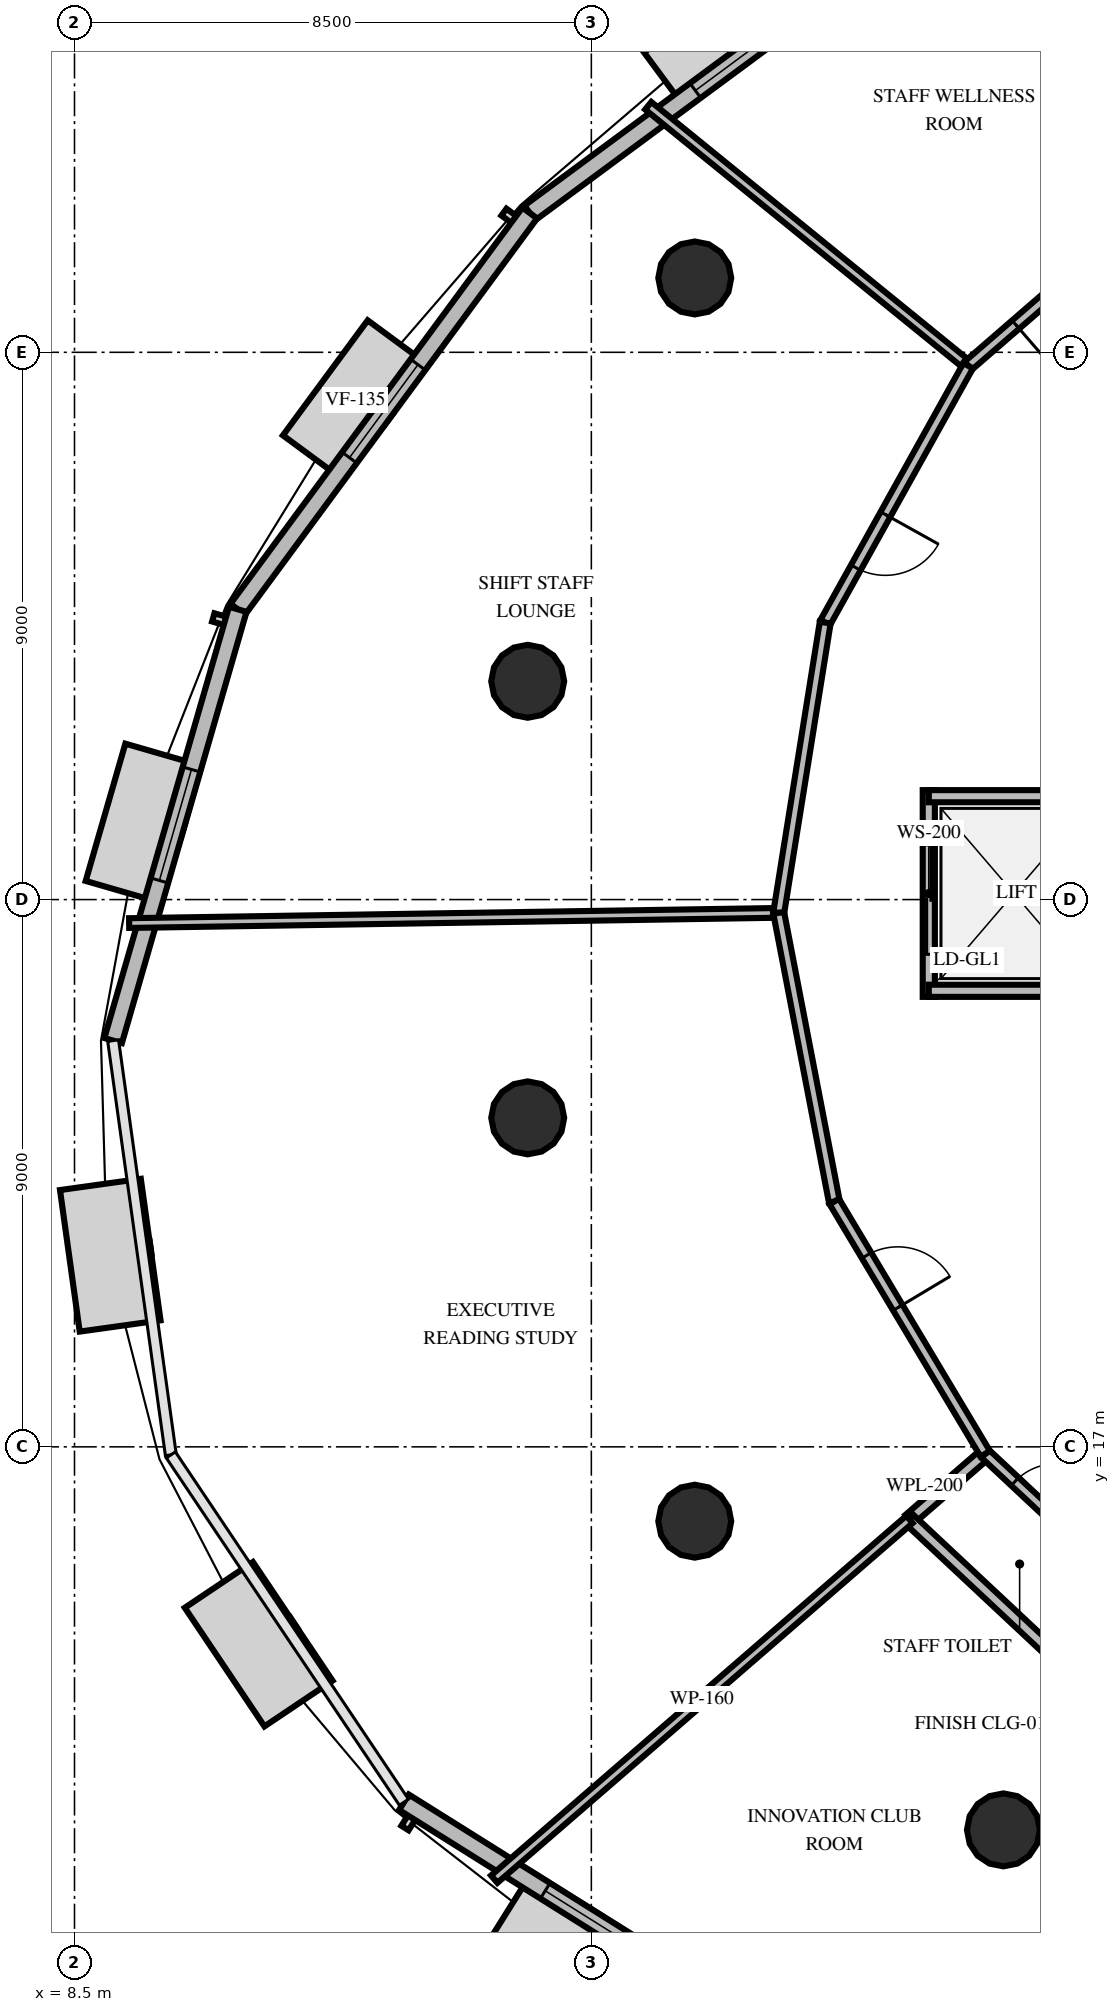
"""IFC4 building model, lengths in metres.
Left out: names, types, materials, properties, quantities, classifications, styles, units other than length and angle.
Written with IfcOpenShell. Run it as: python <this file> out.ifc"""

import sys

from ifc_helpers import new_model, si_unit, direction, frame, frame_2d, origin, origin_2d, place, context, subcontext, project, spatial, rectangle, circle, extrude, element, fill, save


model = new_model("IFC4")
c1 = context("Model", 3, precision=1e-05, world=origin(), true_north=direction((0.0, 1.0)))
c2 = subcontext(c1, "Body", "Model", "MODEL_VIEW")
j1 = project(units=[si_unit("LENGTHUNIT", "METRE"), si_unit("PLANEANGLEUNIT", "RADIAN")], contexts=[c1])
p1 = place(None, origin())
s1 = spatial("IfcSite", under=j1, at=p1, CompositionType="ELEMENT")
p2 = place(p1, origin())
s2 = spatial("IfcBuilding", under=s1, at=p2, CompositionType="ELEMENT")
p3 = place(p2, frame((0.0, 0.0, 121.8)))
s3 = spatial("IfcBuildingStorey", under=s2, at=p3, CompositionType="ELEMENT", Elevation=121.8)
for number, where, z_axis, x_axis in (
    (1, (18.701, 36.222, 0.0), (0.0, 0.0, 1.0), (1.0, 0.0, 0.0)),
    (2, (15.954, 29.59, 0.0), (0.0, 0.0, 1.0), (1.0, 0.0, 0.0)),
    (3, (15.954, 22.41, 0.0), (0.0, 0.0, 1.0), (1.0, 0.0, 0.0)),
    (4, (18.701, 15.778, 0.0), (0.0, 0.0, 1.0), (1.0, 0.0, 0.0)),
    (5, (23.778, 10.701, 0.0), (0.0, 0.0, 1.0), (1.0, 0.0, 0.0)),
):
    element("IfcColumn", number, at=place(p3, frame(where, z_axis=z_axis, x_axis=x_axis)), inside=s3, PredefinedType="COLUMN", context=c2, shape_type="SweptSolid", body=[
        extrude(circle(Radius=0.6, at=origin_2d()), origin(), (0.0, 0.0, 1.0), 4.0),
    ])
p4 = place(p3, frame((22.961, 42.446, 0.0), z_axis=(0.0, 0.0, 1.0), x_axis=(-0.804159175469, -0.594414014395, 0.0)))
e6 = element("IfcWall", 6, at=p4, inside=s3, PredefinedType="SOLIDWALL", context=c2, shape_type="SweptSolid", body=[
    extrude(rectangle(XDim=8.673, YDim=0.3, at=frame_2d((4.336, 0.0))), origin(), (0.0, 0.0, 1.0), 2.9),
])
p5 = place(p4, frame((3.386, 0.0, 0.8)))
e7 = element("IfcOpeningElement", 7, at=p5, cuts=e6, PredefinedType="OPENING", context=c2, shape_type="SweptSolid", body=[
    extrude(rectangle(XDim=1.9, YDim=1.95, at=frame_2d((0.95, 0.975))), frame((0.0, 0.16, 0.0), z_axis=(0.0, -1.0, 0.0), x_axis=(1.0, 0.0, 0.0)), (0.0, 0.0, 1.0), 0.32),
])
p6 = place(p3, frame((15.987, 37.291, 0.0), z_axis=(0.0, 0.0, 1.0), x_axis=(-0.593159944835, -0.805084641416, 0.0)))
e8 = element("IfcWall", 8, at=p6, inside=s3, PredefinedType="SOLIDWALL", context=c2, shape_type="SweptSolid", body=[
    extrude(rectangle(XDim=8.095, YDim=0.3, at=frame_2d((4.048, 0.0))), origin(), (0.0, 0.0, 1.0), 2.9),
])
p7 = place(p6, frame((3.098, 0.0, 0.8)))
e9 = element("IfcOpeningElement", 9, at=p7, cuts=e8, PredefinedType="OPENING", context=c2, shape_type="SweptSolid", body=[
    extrude(rectangle(XDim=1.9, YDim=1.95, at=frame_2d((0.95, 0.975))), frame((0.0, 0.16, 0.0), z_axis=(0.0, -1.0, 0.0), x_axis=(1.0, 0.0, 0.0)), (0.0, 0.0, 1.0), 0.32),
])
p8 = place(p3, frame((11.185, 30.774, 0.0), z_axis=(0.0, 0.0, 1.0), x_axis=(-0.277637317475, -0.960685963229, 0.0)))
e10 = element("IfcWall", 10, at=p8, inside=s3, PredefinedType="SOLIDWALL", context=c2, shape_type="SweptSolid", body=[
    extrude(rectangle(XDim=7.383, YDim=0.3, at=frame_2d((3.691, 0.0))), origin(), (0.0, 0.0, 1.0), 2.9),
])
p9 = place(p8, frame((2.742, 0.0, 0.8)))
e11 = element("IfcOpeningElement", 11, at=p9, cuts=e10, PredefinedType="OPENING", context=c2, shape_type="SweptSolid", body=[
    extrude(rectangle(XDim=1.9, YDim=1.95, at=frame_2d((0.95, 0.975))), frame((0.0, 0.16, 0.0), z_axis=(0.0, -1.0, 0.0), x_axis=(1.0, 0.0, 0.0)), (0.0, 0.0, 1.0), 0.32),
])
p10 = place(p3, frame((13.918, 11.156, 0.0), z_axis=(0.0, 0.0, 1.0), x_axis=(0.847299081662, -0.531116057199, 0.0)))
e12 = element("IfcWall", 12, at=p10, inside=s3, PredefinedType="SOLIDWALL", context=c2, shape_type="SweptSolid", body=[
    extrude(rectangle(XDim=7.383, YDim=0.3, at=frame_2d((3.692, 0.0))), origin(), (0.0, 0.0, 1.0), 2.9),
])
p11 = place(p10, frame((2.742, 0.0, 0.8)))
e13 = element("IfcOpeningElement", 13, at=p11, cuts=e12, PredefinedType="OPENING", context=c2, shape_type="SweptSolid", body=[
    extrude(rectangle(XDim=1.9, YDim=1.95, at=frame_2d((0.95, 0.975))), frame((0.0, 0.16, 0.0), z_axis=(0.0, -1.0, 0.0), x_axis=(1.0, 0.0, 0.0)), (0.0, 0.0, 1.0), 0.32),
])
p12 = place(p3, frame((22.55, 24.4, 0.0), z_axis=(0.0, 0.0, 1.0), x_axis=(0.0, 1.0, 0.0)))
e14 = element("IfcWall", 14, at=p12, inside=s3, PredefinedType="SOLIDWALL", context=c2, shape_type="SweptSolid", body=[
    extrude(rectangle(XDim=3.4, YDim=0.2, at=frame_2d((1.7, 0.0))), origin(), (0.0, 0.0, 1.0), 2.8),
])
p13 = place(p12, frame((0.7, 0.0, 0.0)))
e15 = element("IfcOpeningElement", 15, at=p13, cuts=e14, PredefinedType="OPENING", context=c2, shape_type="SweptSolid", body=[
    extrude(rectangle(XDim=1.8, YDim=2.4, at=frame_2d((0.9, 1.2))), frame((0.0, 0.11, 0.0), z_axis=(0.0, -1.0, 0.0), x_axis=(1.0, 0.0, 0.0)), (0.0, 0.0, 1.0), 0.22),
])
for number, where, z_axis, x_axis in (
    (16, (22.55, 24.5, 0.0), (0.0, 0.0, 1.0), (1.0, 0.0, 0.0)),
    (17, (22.55, 27.7, 0.0), (0.0, 0.0, 1.0), (1.0, 0.0, 0.0)),
):
    element("IfcWall", number, at=place(p3, frame(where, z_axis=z_axis, x_axis=x_axis)), inside=s3, PredefinedType="SOLIDWALL", context=c2, shape_type="SweptSolid", body=[
        extrude(rectangle(XDim=2.8, YDim=0.2, at=frame_2d((1.4, 0.0))), origin(), (0.0, 0.0, 1.0), 2.8),
    ])
p14 = place(p3, frame((23.479, 16.886, 0.0), z_axis=(0.0, 0.0, 1.0), x_axis=(-0.755830650618, -0.654767155244, 0.0)))
e18 = element("IfcWall", 18, at=p14, inside=s3, PredefinedType="PLUMBINGWALL", context=c2, shape_type="SweptSolid", body=[
    extrude(rectangle(XDim=1.65, YDim=0.2, at=frame_2d((0.825, 0.0))), origin(), (0.0, 0.0, 1.0), 2.8),
])
p15 = place(p3, frame((22.231, 15.806, 0.0), z_axis=(0.0, 0.0, 1.0), x_axis=(0.730156733986, -0.683279696622, 0.0)))
e19 = element("IfcWall", 19, at=p15, inside=s3, PredefinedType="PLUMBINGWALL", context=c2, shape_type="SweptSolid", body=[
    extrude(rectangle(XDim=3.255, YDim=0.2, at=frame_2d((1.627, 0.0))), origin(), (0.0, 0.0, 1.0), 2.8),
])
p16 = place(p3, frame((23.479, 16.886, 0.0), z_axis=(0.0, 0.0, 1.0), x_axis=(0.730167440001, -0.683268255931, 0.0)))
e20 = element("IfcWall", 20, at=p16, inside=s3, PredefinedType="PARTITIONING", context=c2, shape_type="SweptSolid", body=[
    extrude(rectangle(XDim=2.91, YDim=0.18, at=frame_2d((1.455, 0.0))), origin(), (0.0, 0.0, 1.0), 2.8),
])
p17 = place(p16, frame((0.669, 0.0, 0.0)))
e21 = element("IfcOpeningElement", 21, at=p17, cuts=e20, PredefinedType="OPENING", context=c2, shape_type="SweptSolid", body=[
    extrude(rectangle(XDim=0.92, YDim=2.1, at=frame_2d((0.46, 1.05))), frame((0.0, 0.1, 0.0), z_axis=(0.0, -1.0, 0.0), x_axis=(1.0, 0.0, 0.0)), (0.0, 0.0, 1.0), 0.2),
])
p18 = place(p3, frame((22.231, 15.806, 0.0), z_axis=(0.0, 0.0, 1.0), x_axis=(-0.755858471294, -0.65473503906, 0.0)))
e22 = element("IfcWall", 22, at=p18, inside=s3, PredefinedType="PARTITIONING", context=c2, shape_type="SweptSolid", body=[
    extrude(rectangle(XDim=9.034, YDim=0.16, at=frame_2d((4.517, 0.0))), origin(), (0.0, 0.0, 1.0), 2.8),
])
p19 = place(p3, frame((23.198, 34.779, 0.0), z_axis=(0.0, 0.0, 1.0), x_axis=(-0.776061128034, 0.630657692854, 0.0)))
e23 = element("IfcWall", 23, at=p19, inside=s3, PredefinedType="PARTITIONING", context=c2, shape_type="SweptSolid", body=[
    extrude(rectangle(XDim=6.78, YDim=0.16, at=frame_2d((3.39, 0.0))), origin(), (0.0, 0.0, 1.0), 2.8),
])
p20 = place(p3, frame((26.852, 37.944, 0.0), z_axis=(0.0, 0.0, 1.0), x_axis=(-0.755849022926, -0.654745946564, 0.0)))
e24 = element("IfcWall", 24, at=p20, inside=s3, PredefinedType="PARTITIONING", context=c2, shape_type="SweptSolid", body=[
    extrude(rectangle(XDim=4.834, YDim=0.18, at=frame_2d((2.417, 0.0))), origin(), (0.0, 0.0, 1.0), 2.8),
])
p21 = place(p20, frame((2.801, 0.0, 0.0)))
e25 = element("IfcOpeningElement", 25, at=p21, cuts=e24, PredefinedType="OPENING", context=c2, shape_type="SweptSolid", body=[
    extrude(rectangle(XDim=1.0, YDim=2.15, at=frame_2d((0.5, 1.075))), frame((0.0, 0.1, 0.0), z_axis=(0.0, -1.0, 0.0), x_axis=(1.0, 0.0, 0.0)), (0.0, 0.0, 1.0), 0.2),
])
p22 = place(p3, frame((20.082, 25.781, 0.0), z_axis=(0.0, 0.0, 1.0), x_axis=(-0.999876419075, -0.015720896209, 0.0)))
e26 = element("IfcWall", 26, at=p22, inside=s3, PredefinedType="PARTITIONING", context=c2, shape_type="SweptSolid", body=[
    extrude(rectangle(XDim=10.684, YDim=0.16, at=frame_2d((5.342, 0.0))), origin(), (0.0, 0.0, 1.0), 2.8),
])
p23 = place(p3, frame((23.198, 34.779, 0.0), z_axis=(0.0, 0.0, 1.0), x_axis=(-0.486367394504, -0.873754403459, 0.0)))
e27 = element("IfcWall", 27, at=p23, inside=s3, PredefinedType="PARTITIONING", context=c2, shape_type="SweptSolid", body=[
    extrude(rectangle(XDim=4.834, YDim=0.18, at=frame_2d((2.417, 0.0))), origin(), (0.0, 0.0, 1.0), 2.8),
])
p24 = place(p23, frame((2.801, 0.0, 0.0)))
e28 = element("IfcOpeningElement", 28, at=p24, cuts=e27, PredefinedType="OPENING", context=c2, shape_type="SweptSolid", body=[
    extrude(rectangle(XDim=1.0, YDim=2.15, at=frame_2d((0.5, 1.075))), frame((0.0, 0.1, 0.0), z_axis=(0.0, -1.0, 0.0), x_axis=(1.0, 0.0, 0.0)), (0.0, 0.0, 1.0), 0.2),
])
p25 = place(p3, frame((20.846, 30.555, 0.0), z_axis=(0.0, 0.0, 1.0), x_axis=(-0.158122467289, -0.987419508283, 0.0)))
e29 = element("IfcWall", 29, at=p25, inside=s3, PredefinedType="PARTITIONING", context=c2, shape_type="SweptSolid", body=[
    extrude(rectangle(XDim=4.834, YDim=0.18, at=frame_2d((2.417, 0.0))), origin(), (0.0, 0.0, 1.0), 2.8),
])
p26 = place(p3, frame((20.082, 25.781, 0.0), z_axis=(0.0, 0.0, 1.0), x_axis=(0.18907027834, -0.98196355831, 0.0)))
e30 = element("IfcWall", 30, at=p26, inside=s3, PredefinedType="PARTITIONING", context=c2, shape_type="SweptSolid", body=[
    extrude(rectangle(XDim=4.834, YDim=0.18, at=frame_2d((2.417, 0.0))), origin(), (0.0, 0.0, 1.0), 2.8),
])
p27 = place(p3, frame((20.996, 21.034, 0.0), z_axis=(0.0, 0.0, 1.0), x_axis=(0.513544831917, -0.858062763212, 0.0)))
e31 = element("IfcWall", 31, at=p27, inside=s3, PredefinedType="PARTITIONING", context=c2, shape_type="SweptSolid", body=[
    extrude(rectangle(XDim=4.834, YDim=0.18, at=frame_2d((2.417, 0.0))), origin(), (0.0, 0.0, 1.0), 2.8),
])
p28 = place(p27, frame((1.034, 0.0, 0.0)))
e32 = element("IfcOpeningElement", 32, at=p28, cuts=e31, PredefinedType="OPENING", context=c2, shape_type="SweptSolid", body=[
    extrude(rectangle(XDim=1.0, YDim=2.15, at=frame_2d((0.5, 1.075))), frame((0.0, 0.1, 0.0), z_axis=(0.0, -1.0, 0.0), x_axis=(1.0, 0.0, 0.0)), (0.0, 0.0, 1.0), 0.2),
])
p29 = place(p5, origin())
e33 = element("IfcWindow", 33, at=p29, inside=s3, PartitioningType="SINGLE_PANEL", PredefinedType="WINDOW", context=c2, shape_type="SweptSolid", body=[
    extrude(rectangle(XDim=1.9, YDim=1.95, at=frame_2d((0.95, 0.975))), frame((0.0, 0.03, 0.0), z_axis=(0.0, -1.0, 0.0), x_axis=(1.0, 0.0, 0.0)), (0.0, 0.0, 1.0), 0.06),
])
fill(e7, e33)
p30 = place(p7, origin())
e34 = element("IfcWindow", 34, at=p30, inside=s3, PartitioningType="SINGLE_PANEL", PredefinedType="WINDOW", context=c2, shape_type="SweptSolid", body=[
    extrude(rectangle(XDim=1.9, YDim=1.95, at=frame_2d((0.95, 0.975))), frame((0.0, 0.03, 0.0), z_axis=(0.0, -1.0, 0.0), x_axis=(1.0, 0.0, 0.0)), (0.0, 0.0, 1.0), 0.06),
])
fill(e9, e34)
p31 = place(p9, origin())
e35 = element("IfcWindow", 35, at=p31, inside=s3, PartitioningType="SINGLE_PANEL", PredefinedType="WINDOW", context=c2, shape_type="SweptSolid", body=[
    extrude(rectangle(XDim=1.9, YDim=1.95, at=frame_2d((0.95, 0.975))), frame((0.0, 0.03, 0.0), z_axis=(0.0, -1.0, 0.0), x_axis=(1.0, 0.0, 0.0)), (0.0, 0.0, 1.0), 0.06),
])
fill(e11, e35)
p32 = place(p11, origin())
e36 = element("IfcWindow", 36, at=p32, inside=s3, PartitioningType="SINGLE_PANEL", PredefinedType="WINDOW", context=c2, shape_type="SweptSolid", body=[
    extrude(rectangle(XDim=1.9, YDim=1.95, at=frame_2d((0.95, 0.975))), frame((0.0, 0.03, 0.0), z_axis=(0.0, -1.0, 0.0), x_axis=(1.0, 0.0, 0.0)), (0.0, 0.0, 1.0), 0.06),
])
fill(e13, e36)
p33 = place(p13, origin())
e37 = element("IfcDoor", 37, at=p33, inside=s3, OperationType="DOUBLE_DOOR_SLIDING", PredefinedType="USERDEFINED", context=c2, shape_type="SweptSolid", body=[
    extrude(rectangle(XDim=1.8, YDim=2.4, at=frame_2d((0.9, 1.2))), frame((0.0, 0.025, 0.0), z_axis=(0.0, -1.0, 0.0), x_axis=(1.0, 0.0, 0.0)), (0.0, 0.0, 1.0), 0.05),
])
fill(e15, e37)
p34 = place(p17, origin())
e38 = element("IfcDoor", 38, at=p34, inside=s3, OperationType="SINGLE_SWING_RIGHT", PredefinedType="DOOR", context=c2, shape_type="SweptSolid", body=[
    extrude(rectangle(XDim=0.92, YDim=2.1, at=frame_2d((0.46, 1.05))), frame((0.0, 0.025, 0.0), z_axis=(0.0, -1.0, 0.0), x_axis=(1.0, 0.0, 0.0)), (0.0, 0.0, 1.0), 0.05),
])
fill(e21, e38)
p35 = place(p21, origin())
e39 = element("IfcDoor", 39, at=p35, inside=s3, OperationType="SINGLE_SWING_RIGHT", PredefinedType="DOOR", context=c2, shape_type="SweptSolid", body=[
    extrude(rectangle(XDim=1.0, YDim=2.15, at=frame_2d((0.5, 1.075))), frame((0.0, 0.025, 0.0), z_axis=(0.0, -1.0, 0.0), x_axis=(1.0, 0.0, 0.0)), (0.0, 0.0, 1.0), 0.05),
])
fill(e25, e39)
p36 = place(p24, origin())
e40 = element("IfcDoor", 40, at=p36, inside=s3, OperationType="SINGLE_SWING_LEFT", PredefinedType="DOOR", context=c2, shape_type="SweptSolid", body=[
    extrude(rectangle(XDim=1.0, YDim=2.15, at=frame_2d((0.5, 1.075))), frame((0.0, 0.025, 0.0), z_axis=(0.0, -1.0, 0.0), x_axis=(1.0, 0.0, 0.0)), (0.0, 0.0, 1.0), 0.05),
])
fill(e28, e40)
p37 = place(p28, origin())
e41 = element("IfcDoor", 41, at=p37, inside=s3, OperationType="SINGLE_SWING_RIGHT", PredefinedType="DOOR", context=c2, shape_type="SweptSolid", body=[
    extrude(rectangle(XDim=1.0, YDim=2.15, at=frame_2d((0.5, 1.075))), frame((0.0, 0.025, 0.0), z_axis=(0.0, -1.0, 0.0), x_axis=(1.0, 0.0, 0.0)), (0.0, 0.0, 1.0), 0.05),
])
fill(e32, e41)
save(model, sys.argv[1])
